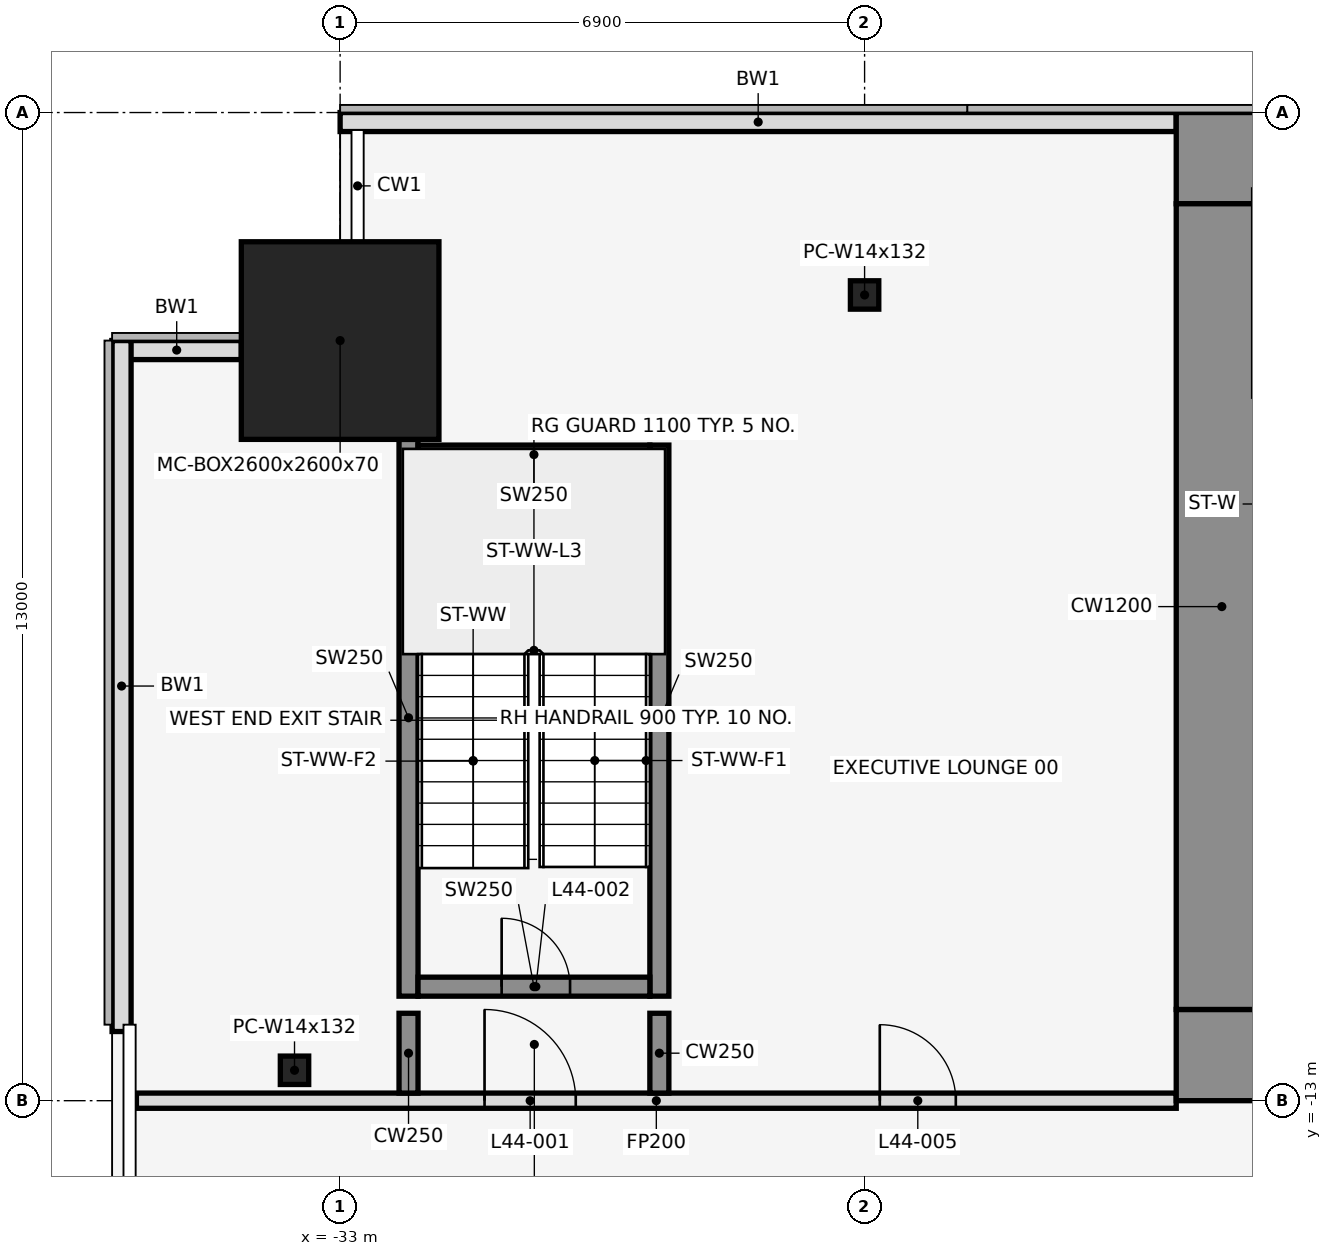
"""IFC4 building model, lengths in metres.
Left out: names, types, materials, properties, quantities, classifications, styles, units other than length and angle.
Written with IfcOpenShell. Run it as: python <this file> out.ifc"""

import sys

from ifc_helpers import new_model, si_unit, direction, frame, frame_2d, origin, origin_2d, place, context, subcontext, project, spatial, rectangle, hollow_rectangle, i_section, extrude, element, fill, save


model = new_model("IFC4")
c1 = context("Model", 3, precision=1e-05, world=origin(), true_north=direction((0.0, 1.0)))
c2 = subcontext(c1, "Body", "Model", "MODEL_VIEW")
j1 = project(units=[si_unit("LENGTHUNIT", "METRE"), si_unit("PLANEANGLEUNIT", "RADIAN")], contexts=[c1])
p1 = place(None, origin())
s1 = spatial("IfcSite", under=j1, at=p1, CompositionType="ELEMENT")
p2 = place(p1, origin())
s2 = spatial("IfcBuilding", under=s1, at=p2, CompositionType="ELEMENT")
p3 = place(p2, frame((0.0, 0.0, 199.1)))
s3 = spatial("IfcBuildingStorey", under=s2, at=p3, CompositionType="ELEMENT", Elevation=199.1)
p4 = place(p3, frame((-33.0, -3.0, 0.0), z_axis=(0.0, 0.0, 1.0), x_axis=(1.0, 0.0, 0.0)))
e1 = element("IfcColumn", 1, at=p4, inside=s3, PredefinedType="COLUMN", context=c2, shape_type="SweptSolid", body=[
    extrude(hollow_rectangle(XDim=2.6, YDim=2.6, WallThickness=0.07, at=origin_2d()), origin(), (0.0, 0.0, 1.0), 4.1),
])
for number, where, z_axis, x_axis in (
    (2, (-26.1, -2.4, 0.0), (0.0, 0.0, 1.0), (1.0, 0.0, 0.0)),
    (3, (-33.6, -12.6, 0.0), (0.0, 0.0, 1.0), (1.0, 0.0, 0.0)),
):
    element("IfcColumn", number, at=place(p3, frame(where, z_axis=z_axis, x_axis=x_axis)), inside=s3, PredefinedType="COLUMN", context=c2, shape_type="SweptSolid", body=[
        extrude(i_section(OverallWidth=0.373, OverallDepth=0.373, WebThickness=0.016, FlangeThickness=0.026, at=origin_2d()), origin(), (0.0, 0.0, 1.0), 4.1),
    ])
p5 = place(p3, frame((-22.0, -0.125, 0.0), z_axis=(0.0, 0.0, 1.0), x_axis=(-1.0, 0.0, 0.0)))
e4 = element("IfcWall", 4, at=p5, inside=s3, PredefinedType="STANDARD", context=c2, shape_type="SweptSolid", body=[
    extrude(rectangle(XDim=11.0, YDim=0.25, at=frame_2d((5.5, 0.0))), origin(), (0.0, 0.0, 1.0), 3.95),
])
p6 = place(p3, frame((-34.3, -3.125, 0.0), z_axis=(0.0, 0.0, 1.0), x_axis=(-1.0, 0.0, 0.0)))
e5 = element("IfcWall", 5, at=p6, inside=s3, PredefinedType="STANDARD", context=c2, shape_type="SweptSolid", body=[
    extrude(rectangle(XDim=1.7, YDim=0.25, at=frame_2d((0.85, 0.0))), origin(), (0.0, 0.0, 1.0), 3.95),
])
p7 = place(p3, frame((-35.875, -3.0, 0.0), z_axis=(0.0, 0.0, 1.0), x_axis=(0.0, -1.0, 0.0)))
e6 = element("IfcWall", 6, at=p7, inside=s3, PredefinedType="STANDARD", context=c2, shape_type="SweptSolid", body=[
    extrude(rectangle(XDim=9.09, YDim=0.25, at=frame_2d((4.545, 0.0))), origin(), (0.0, 0.0, 1.0), 3.95),
])
p8 = place(p3, frame((-32.1, -11.625, 0.0), z_axis=(0.0, 0.0, 1.0), x_axis=(0.0, 1.0, 0.0)))
e7 = element("IfcWall", 7, at=p8, inside=s3, PredefinedType="SHEAR", context=c2, shape_type="SweptSolid", body=[
    extrude(rectangle(XDim=7.325, YDim=0.25, at=frame_2d((3.663, 0.0))), origin(), (0.0, 0.0, 1.0), 4.1),
])
p9 = place(p3, frame((-28.8, -11.625, 0.0), z_axis=(0.0, 0.0, 1.0), x_axis=(0.0, 1.0, 0.0)))
e8 = element("IfcWall", 8, at=p9, inside=s3, PredefinedType="SHEAR", context=c2, shape_type="SweptSolid", body=[
    extrude(rectangle(XDim=7.25, YDim=0.25, at=frame_2d((3.625, 0.0))), origin(), (0.0, 0.0, 1.0), 4.1),
])
p10 = place(p3, frame((-31.975, -11.5, 0.0), z_axis=(0.0, 0.0, 1.0), x_axis=(1.0, 0.0, 0.0)))
e9 = element("IfcWall", 9, at=p10, inside=s3, PredefinedType="SHEAR", context=c2, shape_type="SweptSolid", body=[
    extrude(rectangle(XDim=3.05, YDim=0.25, at=frame_2d((1.525, 0.0))), origin(), (0.0, 0.0, 1.0), 4.1),
])
p11 = place(p10, frame((1.1, 0.0, 0.0)))
e10 = element("IfcOpeningElement", 10, at=p11, cuts=e9, PredefinedType="OPENING", context=c2, shape_type="SweptSolid", body=[
    extrude(rectangle(XDim=0.9, YDim=2.1, at=frame_2d((0.45, 1.05))), frame((0.0, 0.137, 0.0), z_axis=(0.0, -1.0, 0.0), x_axis=(1.0, 0.0, 0.0)), (0.0, 0.0, 1.0), 0.274),
])
p12 = place(p3, frame((-31.975, -4.5, 0.0), z_axis=(0.0, 0.0, 1.0), x_axis=(1.0, 0.0, 0.0)))
e11 = element("IfcWall", 11, at=p12, inside=s3, PredefinedType="SHEAR", context=c2, shape_type="SweptSolid", body=[
    extrude(rectangle(XDim=3.05, YDim=0.25, at=frame_2d((1.525, 0.0))), origin(), (0.0, 0.0, 1.0), 4.1),
])
p13 = place(p3, frame((-35.68, -13.0, 0.0), z_axis=(0.0, 0.0, 1.0), x_axis=(1.0, 0.0, 0.0)))
e12 = element("IfcWall", 12, at=p13, inside=s3, PredefinedType="PARTITIONING", context=c2, shape_type="SweptSolid", body=[
    extrude(rectangle(XDim=13.68, YDim=0.2, at=frame_2d((6.84, 0.0))), origin(), (0.0, 0.0, 1.0), 2.84),
])
p14 = place(p13, frame((4.58, 0.0, 0.0)))
e13 = element("IfcOpeningElement", 13, at=p14, cuts=e12, PredefinedType="OPENING", context=c2, shape_type="SweptSolid", body=[
    extrude(rectangle(XDim=1.2, YDim=2.1, at=frame_2d((0.6, 1.05))), frame((0.0, 0.112, 0.0), z_axis=(0.0, -1.0, 0.0), x_axis=(1.0, 0.0, 0.0)), (0.0, 0.0, 1.0), 0.224),
])
p15 = place(p13, frame((9.78, 0.0, 0.0)))
e14 = element("IfcOpeningElement", 14, at=p15, cuts=e12, PredefinedType="OPENING", context=c2, shape_type="SweptSolid", body=[
    extrude(rectangle(XDim=1.0, YDim=2.1, at=frame_2d((0.5, 1.05))), frame((0.0, 0.112, 0.0), z_axis=(0.0, -1.0, 0.0), x_axis=(1.0, 0.0, 0.0)), (0.0, 0.0, 1.0), 0.224),
])
for number, where, z_axis, x_axis in (
    (15, (-32.1, -12.9, 0.0), (0.0, 0.0, 1.0), (0.0, 1.0, 0.0)),
    (16, (-28.8, -12.9, 0.0), (0.0, 0.0, 1.0), (0.0, 1.0, 0.0)),
):
    element("IfcWall", number, at=place(p3, frame(where, z_axis=z_axis, x_axis=x_axis)), inside=s3, PredefinedType="SHEAR", context=c2, shape_type="SweptSolid", body=[
        extrude(rectangle(XDim=1.05, YDim=0.25, at=frame_2d((0.525, 0.0))), origin(), (0.0, 0.0, 1.0), 4.1),
    ])
p16 = place(p3, frame((-22.0, -0.6, 0.0), z_axis=(0.0, 0.0, 1.0), x_axis=(1.0, 0.0, 0.0)))
e17 = element("IfcWall", 17, at=p16, inside=s3, PredefinedType="SHEAR", context=c2, shape_type="SweptSolid", body=[
    extrude(rectangle(XDim=44.0, YDim=1.2, at=frame_2d((22.0, 0.0))), origin(), (0.0, 0.0, 1.0), 4.1),
])
p17 = place(p16, frame((18.55, 0.0, 0.0)))
e18 = element("IfcOpeningElement", 18, at=p17, cuts=e17, PredefinedType="OPENING", context=c2, shape_type="SweptSolid", body=[
    extrude(rectangle(XDim=0.9, YDim=2.1, at=frame_2d((0.45, 1.05))), frame((0.0, 0.612, 0.0), z_axis=(0.0, -1.0, 0.0), x_axis=(1.0, 0.0, 0.0)), (0.0, 0.0, 1.0), 1.224),
])
p18 = place(p16, frame((24.55, 0.0, 0.0)))
e19 = element("IfcOpeningElement", 19, at=p18, cuts=e17, PredefinedType="OPENING", context=c2, shape_type="SweptSolid", body=[
    extrude(rectangle(XDim=0.9, YDim=2.1, at=frame_2d((0.45, 1.05))), frame((0.0, 0.612, 0.0), z_axis=(0.0, -1.0, 0.0), x_axis=(1.0, 0.0, 0.0)), (0.0, 0.0, 1.0), 1.224),
])
p19 = place(p3, frame((-22.0, -12.4, 0.0), z_axis=(0.0, 0.0, 1.0), x_axis=(1.0, 0.0, 0.0)))
e20 = element("IfcWall", 20, at=p19, inside=s3, PredefinedType="SHEAR", context=c2, shape_type="SweptSolid", body=[
    extrude(rectangle(XDim=44.0, YDim=1.2, at=frame_2d((22.0, 0.0))), origin(), (0.0, 0.0, 1.0), 4.1),
])
p20 = place(p19, frame((2.2, 0.0, 0.0)))
e21 = element("IfcOpeningElement", 21, at=p20, cuts=e20, PredefinedType="OPENING", context=c2, shape_type="SweptSolid", body=[
    extrude(rectangle(XDim=1.2, YDim=2.1, at=frame_2d((0.6, 1.05))), frame((0.0, 0.612, 0.0), z_axis=(0.0, -1.0, 0.0), x_axis=(1.0, 0.0, 0.0)), (0.0, 0.0, 1.0), 1.224),
])
p21 = place(p19, frame((21.4, 0.0, 0.0)))
e22 = element("IfcOpeningElement", 22, at=p21, cuts=e20, PredefinedType="OPENING", context=c2, shape_type="SweptSolid", body=[
    extrude(rectangle(XDim=1.2, YDim=2.1, at=frame_2d((0.6, 1.05))), frame((0.0, 0.612, 0.0), z_axis=(0.0, -1.0, 0.0), x_axis=(1.0, 0.0, 0.0)), (0.0, 0.0, 1.0), 1.224),
])
p22 = place(p19, frame((40.6, 0.0, 0.0)))
e23 = element("IfcOpeningElement", 23, at=p22, cuts=e20, PredefinedType="OPENING", context=c2, shape_type="SweptSolid", body=[
    extrude(rectangle(XDim=1.2, YDim=2.1, at=frame_2d((0.6, 1.05))), frame((0.0, 0.612, 0.0), z_axis=(0.0, -1.0, 0.0), x_axis=(1.0, 0.0, 0.0)), (0.0, 0.0, 1.0), 1.224),
])
p23 = place(p19, frame((16.0, 0.0, 0.0)))
e24 = element("IfcOpeningElement", 24, at=p23, cuts=e20, PredefinedType="OPENING", context=c2, shape_type="SweptSolid", body=[
    extrude(rectangle(XDim=1.8, YDim=2.1, at=frame_2d((0.9, 1.05))), frame((0.0, 0.612, 0.0), z_axis=(0.0, -1.0, 0.0), x_axis=(1.0, 0.0, 0.0)), (0.0, 0.0, 1.0), 1.224),
])
p24 = place(p19, frame((6.3, 0.0, 0.0)))
e25 = element("IfcOpeningElement", 25, at=p24, cuts=e20, PredefinedType="OPENING", context=c2, shape_type="SweptSolid", body=[
    extrude(rectangle(XDim=1.2, YDim=2.1, at=frame_2d((0.6, 1.05))), frame((0.0, 0.612, 0.0), z_axis=(0.0, -1.0, 0.0), x_axis=(1.0, 0.0, 0.0)), (0.0, 0.0, 1.0), 1.224),
])
p25 = place(p19, frame((26.2, 0.0, 0.0)))
e26 = element("IfcOpeningElement", 26, at=p25, cuts=e20, PredefinedType="OPENING", context=c2, shape_type="SweptSolid", body=[
    extrude(rectangle(XDim=1.8, YDim=2.1, at=frame_2d((0.9, 1.05))), frame((0.0, 0.612, 0.0), z_axis=(0.0, -1.0, 0.0), x_axis=(1.0, 0.0, 0.0)), (0.0, 0.0, 1.0), 1.224),
])
p26 = place(p19, frame((36.5, 0.0, 0.0)))
e27 = element("IfcOpeningElement", 27, at=p26, cuts=e20, PredefinedType="OPENING", context=c2, shape_type="SweptSolid", body=[
    extrude(rectangle(XDim=1.2, YDim=2.1, at=frame_2d((0.6, 1.05))), frame((0.0, 0.612, 0.0), z_axis=(0.0, -1.0, 0.0), x_axis=(1.0, 0.0, 0.0)), (0.0, 0.0, 1.0), 1.224),
])
p27 = place(p3, frame((-21.4, -11.8, 0.0), z_axis=(0.0, 0.0, 1.0), x_axis=(0.0, 1.0, 0.0)))
e28 = element("IfcWall", 28, at=p27, inside=s3, PredefinedType="SHEAR", context=c2, shape_type="SweptSolid", body=[
    extrude(rectangle(XDim=10.6, YDim=1.2, at=frame_2d((5.3, 0.0))), origin(), (0.0, 0.0, 1.0), 4.1),
])
p28 = place(p14, origin())
e29 = element("IfcDoor", 29, at=p28, inside=s3, OperationType="SINGLE_SWING_LEFT", PredefinedType="DOOR", context=c2, shape_type="SweptSolid", body=[
    extrude(rectangle(XDim=1.2, YDim=2.1, at=frame_2d((0.6, 1.05))), frame((0.0, 0.025, 0.0), z_axis=(0.0, -1.0, 0.0), x_axis=(1.0, 0.0, 0.0)), (0.0, 0.0, 1.0), 0.05),
])
fill(e13, e29)
p29 = place(p11, origin())
e30 = element("IfcDoor", 30, at=p29, inside=s3, OperationType="SINGLE_SWING_LEFT", PredefinedType="DOOR", context=c2, shape_type="SweptSolid", body=[
    extrude(rectangle(XDim=0.9, YDim=2.1, at=frame_2d((0.45, 1.05))), frame((0.0, 0.025, 0.0), z_axis=(0.0, -1.0, 0.0), x_axis=(1.0, 0.0, 0.0)), (0.0, 0.0, 1.0), 0.05),
])
fill(e10, e30)
p30 = place(p15, origin())
e31 = element("IfcDoor", 31, at=p30, inside=s3, OperationType="SINGLE_SWING_LEFT", PredefinedType="DOOR", context=c2, shape_type="SweptSolid", body=[
    extrude(rectangle(XDim=1.0, YDim=2.1, at=frame_2d((0.5, 1.05))), frame((0.0, 0.025, 0.0), z_axis=(0.0, -1.0, 0.0), x_axis=(1.0, 0.0, 0.0)), (0.0, 0.0, 1.0), 0.05),
])
fill(e14, e31)
save(model, sys.argv[1])
